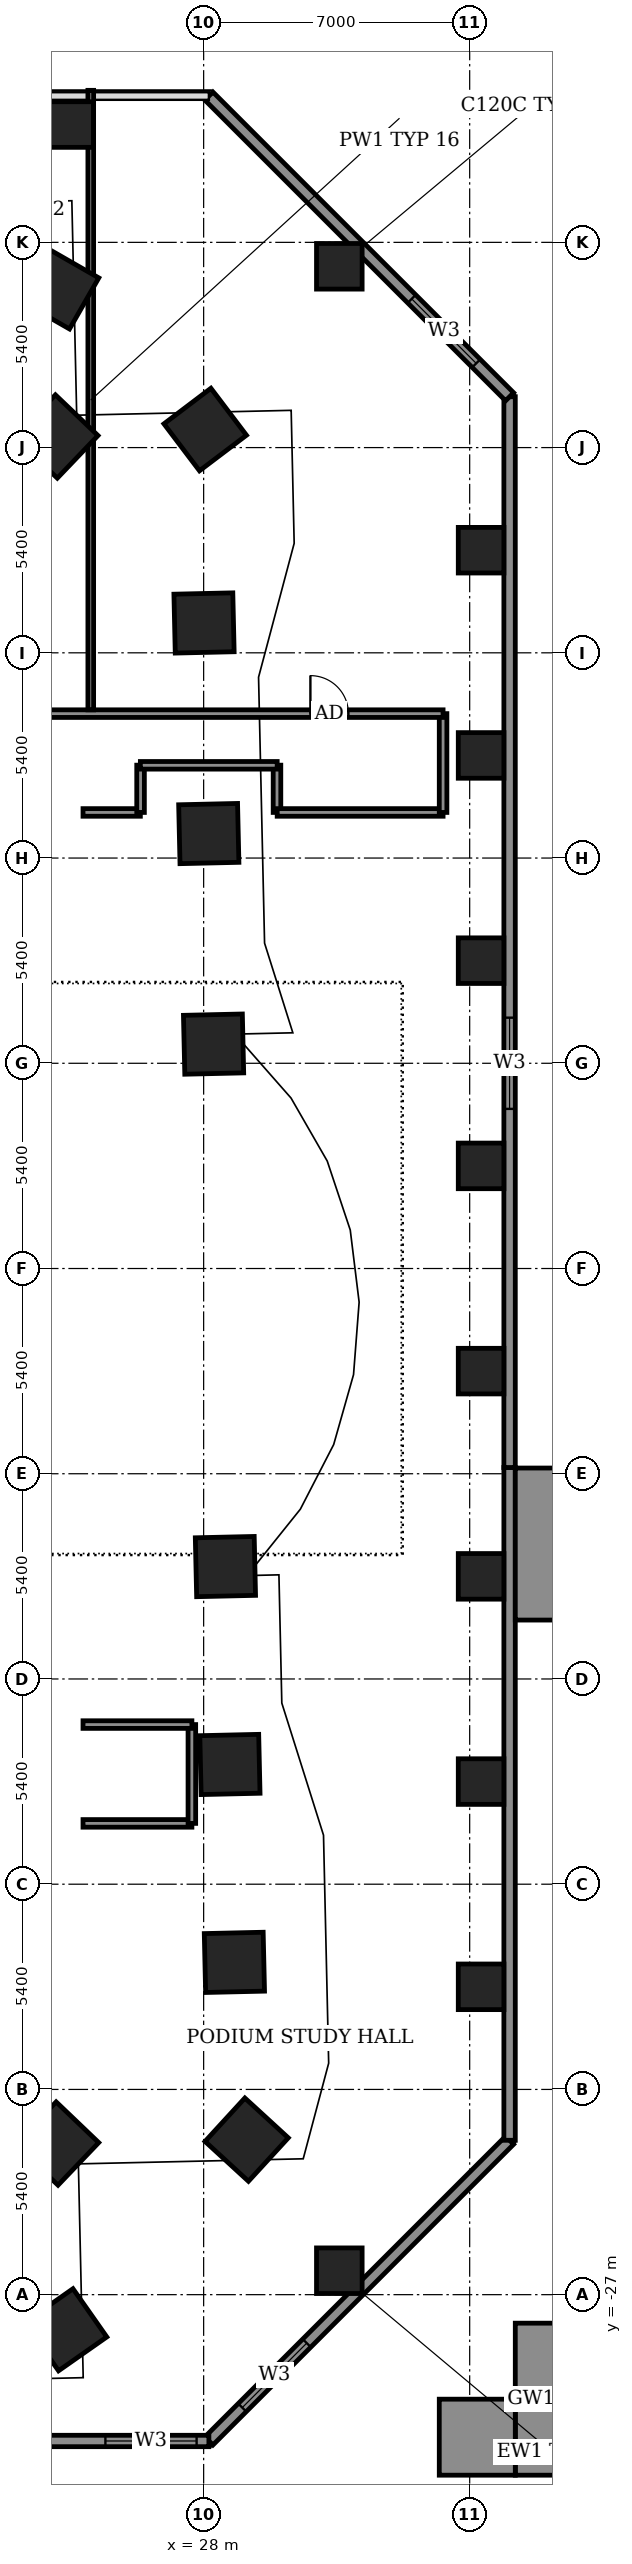
"""IFC4 building model, lengths in metres.
Left out: names, types, materials, properties, quantities, classifications, styles, units other than length and angle.
Written with IfcOpenShell. Run it as: python <this file> out.ifc"""

import sys

from ifc_helpers import new_model, si_unit, direction, frame, frame_2d, origin, origin_2d, place, context, subcontext, project, spatial, rectangle, extrude, element, fill, save


model = new_model("IFC4")
c1 = context("Model", 3, precision=1e-05, world=origin(), true_north=direction((0.0, 1.0)))
c2 = subcontext(c1, "Body", "Model", "MODEL_VIEW")
j1 = project(units=[si_unit("LENGTHUNIT", "METRE"), si_unit("PLANEANGLEUNIT", "RADIAN")], contexts=[c1])
p1 = place(None, origin())
s1 = spatial("IfcSite", under=j1, at=p1, CompositionType="ELEMENT")
p2 = place(p1, origin())
s2 = spatial("IfcBuilding", under=s1, at=p2, CompositionType="ELEMENT")
p3 = place(p2, frame((0.0, 0.0, 25.0)))
s3 = spatial("IfcBuildingStorey", under=s2, at=p3, CompositionType="ELEMENT", Elevation=25.0)
for number, where, z_axis, x_axis in (
    (1, (24.372, -27.923, -0.55), (0.0, 0.0, 1.0), (0.819, 0.574, 0.0)),
    (2, (24.144, -23.024, -0.55), (0.0, 0.0, 1.0), (0.691, 0.723, 0.0)),
    (3, (29.132, -22.921, -0.55), (0.0, 0.0, 1.0), (0.676, 0.737, 0.0)),
    (4, (28.809, -18.257, -0.55), (0.0, 0.0, 1.0), (-0.023, 1.0, 0.0)),
    (5, (28.691, -13.05, -0.55), (0.0, 0.0, 1.0), (-0.023, 1.0, 0.0)),
    (6, (28.573, -7.843, -0.55), (0.0, 0.0, 1.0), (-0.023, 1.0, 0.0)),
    (7, (28.261, 5.904, -0.55), (0.0, 0.0, 1.0), (-0.023, 1.0, 0.0)),
    (8, (28.135, 11.444, -0.55), (0.0, 0.0, 1.0), (-0.023, 1.0, 0.0)),
    (9, (28.01, 16.985, -0.55), (0.0, 0.0, 1.0), (-0.023, 1.0, 0.0)),
    (10, (28.041, 22.075, -0.55), (0.0, 0.0, 1.0), (-0.604, 0.797, 0.0)),
    (11, (24.125, 21.892, -0.55), (0.0, 0.0, 1.0), (-0.723, 0.691, 0.0)),
    (12, (24.184, 25.779, -0.55), (0.0, 0.0, 1.0), (-0.868, 0.497, 0.0)),
):
    element("IfcColumn", number, at=place(p3, frame(where, z_axis=z_axis, x_axis=x_axis)), inside=s3, PredefinedType="COLUMN", context=c2, shape_type="SweptSolid", body=[
        extrude(rectangle(XDim=1.55, YDim=1.55, at=origin_2d()), origin(), (0.0, 0.0, 1.0), 4.5),
    ])
for number, where, z_axis, x_axis in (
    (13, (24.5, 30.1, -0.55), (0.0, 0.0, 1.0), (1.0, 0.0, 0.0)),
    (14, (35.3, -18.9, -0.55), (0.0, 0.0, 1.0), (1.0, 0.0, 0.0)),
    (15, (35.3, -13.5, -0.55), (0.0, 0.0, 1.0), (1.0, 0.0, 0.0)),
    (16, (35.3, -8.1, -0.55), (0.0, 0.0, 1.0), (1.0, 0.0, 0.0)),
    (17, (35.3, -2.7, -0.55), (0.0, 0.0, 1.0), (1.0, 0.0, 0.0)),
    (18, (35.3, 2.7, -0.55), (0.0, 0.0, 1.0), (1.0, 0.0, 0.0)),
    (19, (35.3, 8.1, -0.55), (0.0, 0.0, 1.0), (1.0, 0.0, 0.0)),
    (20, (35.3, 13.5, -0.55), (0.0, 0.0, 1.0), (1.0, 0.0, 0.0)),
    (21, (35.3, 18.9, -0.55), (0.0, 0.0, 1.0), (1.0, 0.0, 0.0)),
    (22, (31.57, 26.37, -0.55), (0.0, 0.0, 1.0), (1.0, 0.0, 0.0)),
    (23, (31.57, -26.37, -0.55), (0.0, 0.0, 1.0), (1.0, 0.0, 0.0)),
):
    element("IfcColumn", number, at=place(p3, frame(where, z_axis=z_axis, x_axis=x_axis)), inside=s3, PredefinedType="COLUMN", context=c2, shape_type="SweptSolid", body=[
        extrude(rectangle(XDim=1.2, YDim=1.2, at=origin_2d()), origin(), (0.0, 0.0, 1.0), 4.5),
    ])
p4 = place(p3, frame((28.138, -30.85, 0.0), z_axis=(0.0, 0.0, 1.0), x_axis=(0.707106781187, 0.707106781187, 0.0)))
e24 = element("IfcWall", 24, at=p4, inside=s3, PredefinedType="SOLIDWALL", context=c2, shape_type="SweptSolid", body=[
    extrude(rectangle(XDim=11.189, YDim=0.3, at=frame_2d((5.595, 0.0))), origin(), (0.0, 0.0, 1.0), 3.95),
])
p5 = place(p4, frame((1.242, 0.0, 0.9)))
e25 = element("IfcOpeningElement", 25, at=p5, cuts=e24, PredefinedType="OPENING", context=c2, shape_type="SweptSolid", body=[
    extrude(rectangle(XDim=2.4, YDim=1.8, at=frame_2d((1.2, 0.9))), frame((0.0, 0.16, 0.0), z_axis=(0.0, -1.0, 0.0), x_axis=(1.0, 0.0, 0.0)), (0.0, 0.0, 1.0), 0.32),
])
p6 = place(p3, frame((36.05, -22.938, 0.0), z_axis=(0.0, 0.0, 1.0), x_axis=(0.0, 1.0, 0.0)))
e26 = element("IfcWall", 26, at=p6, inside=s3, PredefinedType="SOLIDWALL", context=c2, shape_type="SweptSolid", body=[
    extrude(rectangle(XDim=17.702, YDim=0.3, at=frame_2d((8.851, 0.0))), origin(), (0.0, 0.0, 1.0), 3.95),
])
p7 = place(p3, frame((36.05, -5.236, 0.0), z_axis=(0.0, 0.0, 1.0), x_axis=(0.0, 1.0, 0.0)))
e27 = element("IfcWall", 27, at=p7, inside=s3, PredefinedType="SOLIDWALL", context=c2, shape_type="SweptSolid", body=[
    extrude(rectangle(XDim=28.174, YDim=0.3, at=frame_2d((14.087, 0.0))), origin(), (0.0, 0.0, 1.0), 3.95),
])
p8 = place(p7, frame((9.436, 0.0, 0.9)))
e28 = element("IfcOpeningElement", 28, at=p8, cuts=e27, PredefinedType="OPENING", context=c2, shape_type="SweptSolid", body=[
    extrude(rectangle(XDim=2.4, YDim=1.8, at=frame_2d((1.2, 0.9))), frame((0.0, 0.16, 0.0), z_axis=(0.0, -1.0, 0.0), x_axis=(1.0, 0.0, 0.0)), (0.0, 0.0, 1.0), 0.32),
])
p9 = place(p3, frame((36.05, 22.938, 0.0), z_axis=(0.0, 0.0, 1.0), x_axis=(-0.707106781187, 0.707106781187, 0.0)))
e29 = element("IfcWall", 29, at=p9, inside=s3, PredefinedType="SOLIDWALL", context=c2, shape_type="SweptSolid", body=[
    extrude(rectangle(XDim=11.189, YDim=0.3, at=frame_2d((5.595, 0.0))), origin(), (0.0, 0.0, 1.0), 3.95),
])
p10 = place(p9, frame((1.242, 0.0, 0.9)))
e30 = element("IfcOpeningElement", 30, at=p10, cuts=e29, PredefinedType="OPENING", context=c2, shape_type="SweptSolid", body=[
    extrude(rectangle(XDim=2.4, YDim=1.8, at=frame_2d((1.2, 0.9))), frame((0.0, 0.16, 0.0), z_axis=(0.0, -1.0, 0.0), x_axis=(1.0, 0.0, 0.0)), (0.0, 0.0, 1.0), 0.32),
])
p11 = place(p3, frame((-28.138, -30.85, 0.0), z_axis=(0.0, 0.0, 1.0), x_axis=(1.0, 0.0, 0.0)))
e31 = element("IfcWall", 31, at=p11, inside=s3, PredefinedType="SOLIDWALL", context=c2, shape_type="SweptSolid", body=[
    extrude(rectangle(XDim=56.276, YDim=0.3, at=frame_2d((28.138, 0.0))), origin(), (0.0, 0.0, 1.0), 3.95),
])
p12 = place(p11, frame((14.948, 0.0, 0.9)))
e32 = element("IfcOpeningElement", 32, at=p12, cuts=e31, PredefinedType="OPENING", context=c2, shape_type="SweptSolid", body=[
    extrude(rectangle(XDim=2.4, YDim=1.8, at=frame_2d((1.2, 0.9))), frame((0.0, 0.16, 0.0), z_axis=(0.0, -1.0, 0.0), x_axis=(1.0, 0.0, 0.0)), (0.0, 0.0, 1.0), 0.32),
])
p13 = place(p11, frame((21.813, 0.0, 0.9)))
e33 = element("IfcOpeningElement", 33, at=p13, cuts=e31, PredefinedType="OPENING", context=c2, shape_type="SweptSolid", body=[
    extrude(rectangle(XDim=2.4, YDim=1.8, at=frame_2d((1.2, 0.9))), frame((0.0, 0.16, 0.0), z_axis=(0.0, -1.0, 0.0), x_axis=(1.0, 0.0, 0.0)), (0.0, 0.0, 1.0), 0.32),
])
p14 = place(p11, frame((30.373, 0.0, 0.9)))
e34 = element("IfcOpeningElement", 34, at=p14, cuts=e31, PredefinedType="OPENING", context=c2, shape_type="SweptSolid", body=[
    extrude(rectangle(XDim=2.4, YDim=1.8, at=frame_2d((1.2, 0.9))), frame((0.0, 0.16, 0.0), z_axis=(0.0, -1.0, 0.0), x_axis=(1.0, 0.0, 0.0)), (0.0, 0.0, 1.0), 0.32),
])
p15 = place(p11, frame((40.263, 0.0, 0.9)))
e35 = element("IfcOpeningElement", 35, at=p15, cuts=e31, PredefinedType="OPENING", context=c2, shape_type="SweptSolid", body=[
    extrude(rectangle(XDim=2.4, YDim=1.8, at=frame_2d((1.2, 0.9))), frame((0.0, 0.16, 0.0), z_axis=(0.0, -1.0, 0.0), x_axis=(1.0, 0.0, 0.0)), (0.0, 0.0, 1.0), 0.32),
])
p16 = place(p11, frame((53.553, 0.0, 0.9)))
e36 = element("IfcOpeningElement", 36, at=p16, cuts=e31, PredefinedType="OPENING", context=c2, shape_type="SweptSolid", body=[
    extrude(rectangle(XDim=2.4, YDim=1.8, at=frame_2d((1.2, 0.9))), frame((0.0, 0.16, 0.0), z_axis=(0.0, -1.0, 0.0), x_axis=(1.0, 0.0, 0.0)), (0.0, 0.0, 1.0), 0.32),
])
for number, where, z_axis, x_axis in (
    (37, (37.45, -31.75, 0.0), (0.0, 0.0, 1.0), (0.0, 1.0, 0.0)),
    (38, (37.45, -9.25, 0.0), (0.0, 0.0, 1.0), (0.0, 1.0, 0.0)),
):
    element("IfcWall", number, at=place(p3, frame(where, z_axis=z_axis, x_axis=x_axis)), inside=s3, PredefinedType="STANDARD", context=c2, shape_type="SweptSolid", body=[
        extrude(rectangle(XDim=4.0, YDim=2.5, at=frame_2d((2.0, 0.0))), origin(), (0.0, 0.0, 1.0), 4.5),
    ])
p17 = place(p3, frame((34.2, -30.75, 0.0), z_axis=(0.0, 0.0, 1.0), x_axis=(1.0, 0.0, 0.0)))
e39 = element("IfcWall", 39, at=p17, inside=s3, PredefinedType="STANDARD", context=c2, shape_type="SweptSolid", body=[
    extrude(rectangle(XDim=2.0, YDim=2.0, at=frame_2d((1.0, 0.0))), origin(), (0.0, 0.0, 1.0), 4.5),
])
p18 = place(p3, frame((24.826, -14.6, 0.0), z_axis=(0.0, 0.0, 1.0), x_axis=(1.0, 0.0, 0.0)))
e40 = element("IfcWall", 40, at=p18, inside=s3, PredefinedType="PARTITIONING", context=c2, shape_type="SweptSolid", body=[
    extrude(rectangle(XDim=2.865, YDim=0.2, at=frame_2d((1.433, 0.0))), origin(), (0.0, 0.0, 1.0), 3.95),
])
p19 = place(p3, frame((27.69, -14.6, 0.0), z_axis=(0.0, 0.0, 1.0), x_axis=(0.0, 1.0, 0.0)))
e41 = element("IfcWall", 41, at=p19, inside=s3, PredefinedType="PARTITIONING", context=c2, shape_type="SweptSolid", body=[
    extrude(rectangle(XDim=2.6, YDim=0.2, at=frame_2d((1.3, 0.0))), origin(), (0.0, 0.0, 1.0), 3.95),
])
p20 = place(p3, frame((24.826, -12.0, 0.0), z_axis=(0.0, 0.0, 1.0), x_axis=(1.0, 0.0, 0.0)))
e42 = element("IfcWall", 42, at=p20, inside=s3, PredefinedType="PARTITIONING", context=c2, shape_type="SweptSolid", body=[
    extrude(rectangle(XDim=2.865, YDim=0.2, at=frame_2d((1.433, 0.0))), origin(), (0.0, 0.0, 1.0), 3.95),
])
p21 = place(p3, frame((24.826, 12.0, 0.0), z_axis=(0.0, 0.0, 1.0), x_axis=(1.0, 0.0, 0.0)))
e43 = element("IfcWall", 43, at=p21, inside=s3, PredefinedType="PARTITIONING", context=c2, shape_type="SweptSolid", body=[
    extrude(rectangle(XDim=1.509, YDim=0.2, at=frame_2d((0.754, 0.0))), origin(), (0.0, 0.0, 1.0), 3.95),
])
for number, where, z_axis, x_axis in (
    (44, (26.34, 12.0, 0.0), (0.0, 0.0, 1.0), (0.0, 1.0, 0.0)),
    (45, (29.93, 12.0, 0.0), (0.0, 0.0, 1.0), (0.0, 1.0, 0.0)),
):
    element("IfcWall", number, at=place(p3, frame(where, z_axis=z_axis, x_axis=x_axis)), inside=s3, PredefinedType="PARTITIONING", context=c2, shape_type="SweptSolid", body=[
        extrude(rectangle(XDim=1.244, YDim=0.2, at=frame_2d((0.622, 0.0))), origin(), (0.0, 0.0, 1.0), 3.95),
    ])
p22 = place(p3, frame((29.935, 12.0, 0.0), z_axis=(0.0, 0.0, 1.0), x_axis=(1.0, 0.0, 0.0)))
e46 = element("IfcWall", 46, at=p22, inside=s3, PredefinedType="PARTITIONING", context=c2, shape_type="SweptSolid", body=[
    extrude(rectangle(XDim=4.365, YDim=0.2, at=frame_2d((2.183, 0.0))), origin(), (0.0, 0.0, 1.0), 3.95),
])
p23 = place(p3, frame((34.3, 12.0, 0.0), z_axis=(0.0, 0.0, 1.0), x_axis=(0.0, 1.0, 0.0)))
e47 = element("IfcWall", 47, at=p23, inside=s3, PredefinedType="PARTITIONING", context=c2, shape_type="SweptSolid", body=[
    extrude(rectangle(XDim=2.6, YDim=0.2, at=frame_2d((1.3, 0.0))), origin(), (0.0, 0.0, 1.0), 3.95),
])
p24 = place(p3, frame((26.335, 13.24, 0.0), z_axis=(0.0, 0.0, 1.0), x_axis=(1.0, 0.0, 0.0)))
e48 = element("IfcWall", 48, at=p24, inside=s3, PredefinedType="PARTITIONING", context=c2, shape_type="SweptSolid", body=[
    extrude(rectangle(XDim=3.6, YDim=0.2, at=frame_2d((1.8, 0.0))), origin(), (0.0, 0.0, 1.0), 3.95),
])
p25 = place(p3, frame((17.6, 14.6, 0.0), z_axis=(0.0, 0.0, 1.0), x_axis=(1.0, 0.0, 0.0)))
e49 = element("IfcWall", 49, at=p25, inside=s3, PredefinedType="PARTITIONING", context=c2, shape_type="SweptSolid", body=[
    extrude(rectangle(XDim=16.7, YDim=0.2, at=frame_2d((8.35, 0.0))), origin(), (0.0, 0.0, 1.0), 3.95),
])
p26 = place(p25, frame((13.209, 0.0, 0.0)))
e50 = element("IfcOpeningElement", 50, at=p26, cuts=e49, PredefinedType="OPENING", context=c2, shape_type="SweptSolid", body=[
    extrude(rectangle(XDim=1.0, YDim=2.1, at=frame_2d((0.5, 1.05))), frame((0.0, 0.11, 0.0), z_axis=(0.0, -1.0, 0.0), x_axis=(1.0, 0.0, 0.0)), (0.0, 0.0, 1.0), 0.22),
])
p27 = place(p25, frame((0.2, 0.0, 0.0)))
e51 = element("IfcOpeningElement", 51, at=p27, cuts=e49, PredefinedType="OPENING", context=c2, shape_type="SweptSolid", body=[
    extrude(rectangle(XDim=1.0, YDim=2.1, at=frame_2d((0.5, 1.05))), frame((0.0, 0.11, 0.0), z_axis=(0.0, -1.0, 0.0), x_axis=(1.0, 0.0, 0.0)), (0.0, 0.0, 1.0), 0.22),
])
p28 = place(p3, frame((25.03, 14.7, 0.0), z_axis=(0.0, 0.0, 1.0), x_axis=(0.0, 1.0, 0.0)))
e52 = element("IfcWall", 52, at=p28, inside=s3, PredefinedType="PARTITIONING", context=c2, shape_type="SweptSolid", body=[
    extrude(rectangle(XDim=16.3, YDim=0.15, at=frame_2d((8.15, 0.0))), origin(), (0.0, 0.0, 1.0), 0.94),
])
p29 = place(p5, origin())
e53 = element("IfcWindow", 53, at=p29, inside=s3, PartitioningType="DOUBLE_PANEL_VERTICAL", PredefinedType="WINDOW", context=c2, shape_type="SweptSolid", body=[
    extrude(rectangle(XDim=2.4, YDim=1.8, at=frame_2d((1.2, 0.9))), frame((0.0, 0.03, 0.0), z_axis=(0.0, -1.0, 0.0), x_axis=(1.0, 0.0, 0.0)), (0.0, 0.0, 1.0), 0.06),
])
fill(e25, e53)
p30 = place(p8, origin())
e54 = element("IfcWindow", 54, at=p30, inside=s3, PartitioningType="DOUBLE_PANEL_VERTICAL", PredefinedType="WINDOW", context=c2, shape_type="SweptSolid", body=[
    extrude(rectangle(XDim=2.4, YDim=1.8, at=frame_2d((1.2, 0.9))), frame((0.0, 0.03, 0.0), z_axis=(0.0, -1.0, 0.0), x_axis=(1.0, 0.0, 0.0)), (0.0, 0.0, 1.0), 0.06),
])
fill(e28, e54)
p31 = place(p10, origin())
e55 = element("IfcWindow", 55, at=p31, inside=s3, PartitioningType="DOUBLE_PANEL_VERTICAL", PredefinedType="WINDOW", context=c2, shape_type="SweptSolid", body=[
    extrude(rectangle(XDim=2.4, YDim=1.8, at=frame_2d((1.2, 0.9))), frame((0.0, 0.03, 0.0), z_axis=(0.0, -1.0, 0.0), x_axis=(1.0, 0.0, 0.0)), (0.0, 0.0, 1.0), 0.06),
])
fill(e30, e55)
p32 = place(p16, origin())
e56 = element("IfcWindow", 56, at=p32, inside=s3, PartitioningType="DOUBLE_PANEL_VERTICAL", PredefinedType="WINDOW", context=c2, shape_type="SweptSolid", body=[
    extrude(rectangle(XDim=2.4, YDim=1.8, at=frame_2d((1.2, 0.9))), frame((0.0, 0.03, 0.0), z_axis=(0.0, -1.0, 0.0), x_axis=(1.0, 0.0, 0.0)), (0.0, 0.0, 1.0), 0.06),
])
fill(e36, e56)
p33 = place(p26, origin())
e57 = element("IfcDoor", 57, at=p33, inside=s3, OperationType="SINGLE_SWING_LEFT", PredefinedType="DOOR", context=c2, shape_type="SweptSolid", body=[
    extrude(rectangle(XDim=1.0, YDim=2.1, at=frame_2d((0.5, 1.05))), frame((0.0, 0.025, 0.0), z_axis=(0.0, -1.0, 0.0), x_axis=(1.0, 0.0, 0.0)), (0.0, 0.0, 1.0), 0.05),
])
fill(e50, e57)
save(model, sys.argv[1])
